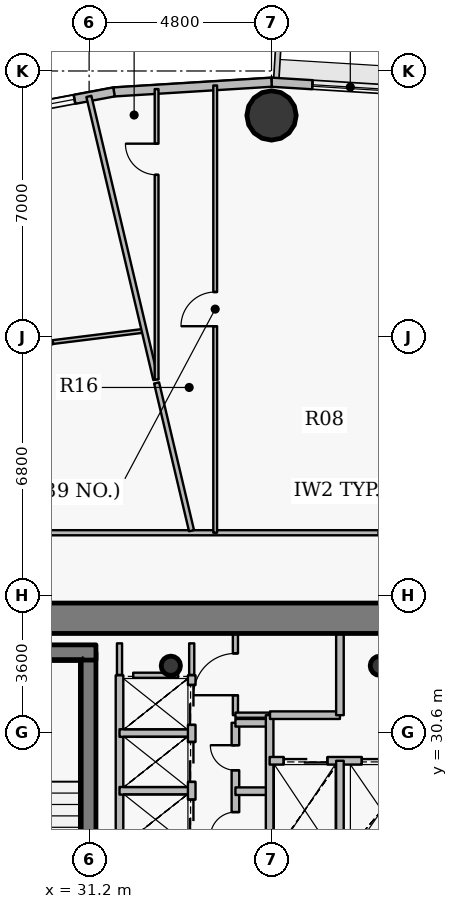
"""IFC4 building model, lengths in metres.
Left out: names, types, materials, properties, quantities, classifications, styles, units other than length and angle.
Written with IfcOpenShell. Run it as: python <this file> out.ifc"""

import sys

from ifc_helpers import new_model, si_unit, direction, frame, frame_2d, origin, origin_2d, place, context, subcontext, project, spatial, rectangle, hollow_circle, extrude, source, transform, mapped, element, fill, save


model = new_model("IFC4")
c1 = context("Model", 3, precision=1e-05, world=origin(), true_north=direction((0.0, 1.0)))
c2 = subcontext(c1, "Body", "Model", "MODEL_VIEW")
j1 = project(units=[si_unit("LENGTHUNIT", "METRE"), si_unit("PLANEANGLEUNIT", "RADIAN")], contexts=[c1])
p1 = place(None, origin())
s1 = spatial("IfcSite", under=j1, at=p1, CompositionType="ELEMENT")
p2 = place(p1, origin())
s2 = spatial("IfcBuilding", under=s1, at=p2, CompositionType="ELEMENT")
p3 = place(p2, frame((0.0, 0.0, 163.65)))
s3 = spatial("IfcBuildingStorey", under=s2, at=p3, CompositionType="ELEMENT", Elevation=163.65)
for number, where, z_axis, x_axis in (
    (1, (38.85, 32.35, 0.0), (0.0, 0.0, 1.0), (1.0, 0.0, 0.0)),
    (2, (33.35, 32.35, 0.0), (0.0, 0.0, 1.0), (1.0, 0.0, 0.0)),
):
    element("IfcColumn", number, at=place(p3, frame(where, z_axis=z_axis, x_axis=x_axis)), inside=s3, PredefinedType="COLUMN", context=c2, shape_type="SweptSolid", body=[
        extrude(hollow_circle(Radius=0.254, WallThickness=0.02, at=origin_2d()), origin(), (0.0, 0.0, 1.0), 3.75),
    ])
p4 = place(p3, frame((31.18, 27.8, 0.0), z_axis=(0.0, 0.0, 1.0), x_axis=(0.0, 1.0, 0.0)))
e3 = element("IfcWall", 3, at=p4, inside=s3, PredefinedType="SHEAR", context=c2, shape_type="SweptSolid", body=[
    extrude(rectangle(XDim=4.9, YDim=0.4, at=frame_2d((2.45, 0.0))), origin(), (0.0, 0.0, 1.0), 3.75),
])
p5 = place(p3, frame((27.28, 32.7, 0.0), z_axis=(0.0, 0.0, 1.0), x_axis=(1.0, 0.0, 0.0)))
e4 = element("IfcWall", 4, at=p5, inside=s3, PredefinedType="SHEAR", context=c2, shape_type="SweptSolid", body=[
    extrude(rectangle(XDim=4.1, YDim=0.4, at=frame_2d((2.05, 0.0))), origin(), (0.0, 0.0, 1.0), 3.75),
])
p6 = place(p3, frame((27.2, 33.6, 0.0), z_axis=(0.0, 0.0, 1.0), x_axis=(1.0, 0.0, 0.0)))
e5 = element("IfcWall", 5, at=p6, inside=s3, PredefinedType="SHEAR", context=c2, shape_type="SweptSolid", body=[
    extrude(rectangle(XDim=17.6, YDim=0.8, at=frame_2d((8.8, 0.0))), origin(), (0.0, 0.0, 1.0), 2.95),
])
p7 = place(p6, frame((13.45, 0.0, 0.0)))
e6 = element("IfcOpeningElement", 6, at=p7, cuts=e5, PredefinedType="OPENING", context=c2, shape_type="SweptSolid", body=[
    extrude(rectangle(XDim=1.15, YDim=2.15, at=origin_2d()), frame((0.575, 0.41, 1.075), z_axis=(0.0, -1.0, 0.0), x_axis=(1.0, 0.0, 0.0)), (0.0, 0.0, 1.0), 0.82),
])
p8 = place(p3, frame((36.0, 46.83, 0.0), z_axis=(0.0, 0.0, 1.0), x_axis=(1.0, 0.0, 0.0)))
e7 = element("IfcColumn", 7, at=p8, inside=s3, PredefinedType="COLUMN", context=c2, shape_type="SweptSolid", body=[
    extrude(hollow_circle(Radius=0.65, WallThickness=0.04, at=origin_2d()), origin(), (0.0, 0.0, 1.0), 3.75),
])
p9 = place(p3, frame((36.0, 47.705, 0.0), z_axis=(0.0, 0.0, 1.0), x_axis=(0.998104600619, -0.061540281305, 0.0)))
e8 = element("IfcWall", 8, at=p9, inside=s3, PredefinedType="SOLIDWALL", context=c2, shape_type="SweptSolid", body=[
    extrude(rectangle(XDim=4.154, YDim=0.24, at=frame_2d((2.077, 0.0))), origin(), (0.0, 0.0, 1.0), 3.5),
])
p10 = place(p9, frame((1.077, 0.0, 0.9)))
e9 = element("IfcOpeningElement", 9, at=p10, cuts=e8, PredefinedType="OPENING", context=c2, shape_type="SweptSolid", body=[
    extrude(rectangle(XDim=2.0, YDim=1.75, at=origin_2d()), frame((1.0, 0.13, 0.875), z_axis=(0.0, -1.0, 0.0), x_axis=(1.0, 0.0, 0.0)), (0.0, 0.0, 1.0), 0.26),
])
p11 = place(p3, frame((31.854, 47.449, 0.0), z_axis=(0.0, 0.0, 1.0), x_axis=(0.998104600619, 0.061540281305, 0.0)))
e10 = element("IfcWall", 10, at=p11, inside=s3, PredefinedType="SOLIDWALL", context=c2, shape_type="SweptSolid", body=[
    extrude(rectangle(XDim=4.154, YDim=0.24, at=frame_2d((2.077, 0.0))), origin(), (0.0, 0.0, 1.0), 3.5),
])
p12 = place(p3, frame((27.811, 46.689, 0.0), z_axis=(0.0, 0.0, 1.0), x_axis=(0.982788108205, 0.184736391573, 0.0)))
e11 = element("IfcWall", 11, at=p12, inside=s3, PredefinedType="SOLIDWALL", context=c2, shape_type="SweptSolid", body=[
    extrude(rectangle(XDim=4.114, YDim=0.24, at=frame_2d((2.057, 0.0))), origin(), (0.0, 0.0, 1.0), 3.5),
])
p13 = place(p12, frame((1.057, 0.0, 0.9)))
e12 = element("IfcOpeningElement", 12, at=p13, cuts=e11, PredefinedType="OPENING", context=c2, shape_type="SweptSolid", body=[
    extrude(rectangle(XDim=2.0, YDim=1.75, at=origin_2d()), frame((1.0, 0.13, 0.875), z_axis=(0.0, -1.0, 0.0), x_axis=(1.0, 0.0, 0.0)), (0.0, 0.0, 1.0), 0.26),
])
p14 = place(p3, frame((24.35, 35.85, 0.0), z_axis=(0.0, 0.0, 1.0), x_axis=(1.0, 0.0, 0.0)))
e13 = element("IfcWall", 13, at=p14, inside=s3, PredefinedType="PARTITIONING", context=c2, shape_type="SweptSolid", body=[
    extrude(rectangle(XDim=29.104, YDim=0.135, at=frame_2d((14.552, 0.0))), origin(), (0.0, 0.0, 1.0), 2.935),
])
p15 = place(p14, frame((15.972, 0.0, 0.0)))
e14 = element("IfcOpeningElement", 14, at=p15, cuts=e13, PredefinedType="OPENING", context=c2, shape_type="SweptSolid", body=[
    extrude(rectangle(XDim=1.0, YDim=2.15, at=origin_2d()), frame((0.5, 0.078, 1.075), z_axis=(0.0, -1.0, 0.0), x_axis=(1.0, 0.0, 0.0)), (0.0, 0.0, 1.0), 0.155),
])
p16 = place(p14, frame((4.074, 0.0, 0.0)))
e15 = element("IfcOpeningElement", 15, at=p16, cuts=e13, PredefinedType="OPENING", context=c2, shape_type="SweptSolid", body=[
    extrude(rectangle(XDim=1.0, YDim=2.15, at=origin_2d()), frame((0.5, 0.078, 1.075), z_axis=(0.0, -1.0, 0.0), x_axis=(1.0, 0.0, 0.0)), (0.0, 0.0, 1.0), 0.155),
])
p17 = place(p3, frame((26.021, 39.181, 0.0), z_axis=(0.0, 0.0, 1.0), x_axis=(0.928787254853, 0.37061332305, 0.0)))
e16 = element("IfcWall", 16, at=p17, inside=s3, PredefinedType="PARTITIONING", context=c2, shape_type="SweptSolid", body=[
    extrude(rectangle(XDim=4.549, YDim=0.1, at=frame_2d((2.275, 0.0))), origin(), (0.0, 0.0, 1.0), 2.935),
])
p18 = place(p3, frame((30.246, 40.867, 0.0), z_axis=(0.0, 0.0, 1.0), x_axis=(0.99240598239, 0.123005553192, 0.0)))
e17 = element("IfcWall", 17, at=p18, inside=s3, PredefinedType="PARTITIONING", context=c2, shape_type="SweptSolid", body=[
    extrude(rectangle(XDim=2.423, YDim=0.1, at=frame_2d((1.212, 0.0))), origin(), (0.0, 0.0, 1.0), 2.935),
])
p19 = place(p3, frame((31.194, 47.33, 0.0), z_axis=(0.0, 0.0, 1.0), x_axis=(0.230064999041, -0.973175264902, 0.0)))
e18 = element("IfcWall", 18, at=p19, inside=s3, PredefinedType="PARTITIONING", context=c2, shape_type="SweptSolid", body=[
    extrude(rectangle(XDim=7.654, YDim=0.135, at=frame_2d((3.827, 0.0))), origin(), (0.0, 0.0, 1.0), 2.935),
])
p20 = place(p3, frame((32.0, 24.1, 0.0), z_axis=(0.0, 0.0, 1.0), x_axis=(0.0, 1.0, 0.0)))
e19 = element("IfcWall", 19, at=p20, inside=s3, PredefinedType="PARTITIONING", context=c2, shape_type="SweptSolid", body=[
    extrude(rectangle(XDim=8.0, YDim=0.2, at=frame_2d((4.0, 0.0))), origin(), (0.0, 0.0, 1.0), 3.5),
])
for number, where, z_axis, x_axis in (
    (20, (32.0, 29.06, 0.0), (0.0, 0.0, 1.0), (1.0, 0.0, 0.0)),
    (21, (32.0, 30.58, 0.0), (0.0, 0.0, 1.0), (1.0, 0.0, 0.0)),
):
    element("IfcWall", number, at=place(p3, frame(where, z_axis=z_axis, x_axis=x_axis)), inside=s3, PredefinedType="PARTITIONING", context=c2, shape_type="SweptSolid", body=[
        extrude(rectangle(XDim=1.9, YDim=0.2, at=frame_2d((0.95, 0.0))), origin(), (0.0, 0.0, 1.0), 3.085),
    ])
p21 = place(p3, frame((32.976, 39.792, 0.0), z_axis=(0.0, 0.0, 1.0), x_axis=(0.230050705958, -0.973178643769, 0.0)))
e22 = element("IfcWall", 22, at=p21, inside=s3, PredefinedType="PARTITIONING", context=c2, shape_type="SweptSolid", body=[
    extrude(rectangle(XDim=3.996, YDim=0.135, at=frame_2d((1.998, 0.0))), origin(), (0.0, 0.0, 1.0), 3.5),
])
p22 = place(p3, frame((32.976, 39.884, 0.0), z_axis=(0.0, 0.0, 1.0), x_axis=(0.0, 1.0, 0.0)))
e23 = element("IfcWall", 23, at=p22, inside=s3, PredefinedType="PARTITIONING", context=c2, shape_type="SweptSolid", body=[
    extrude(rectangle(XDim=7.64, YDim=0.1, at=frame_2d((3.82, 0.0))), origin(), (0.0, 0.0, 1.0), 2.935),
])
p23 = place(p22, frame((5.384, 0.0, 0.0)))
e24 = element("IfcOpeningElement", 24, at=p23, cuts=e23, PredefinedType="OPENING", context=c2, shape_type="SweptSolid", body=[
    extrude(rectangle(XDim=0.82, YDim=2.1, at=origin_2d()), frame((0.41, 0.06, 1.05), z_axis=(0.0, -1.0, 0.0), x_axis=(1.0, 0.0, 0.0)), (0.0, 0.0, 1.0), 0.12),
])
p24 = place(p3, frame((33.9, 20.8, 0.0), z_axis=(0.0, 0.0, 1.0), x_axis=(0.0, 1.0, 0.0)))
e25 = element("IfcWall", 25, at=p24, inside=s3, PredefinedType="PARTITIONING", context=c2, shape_type="SweptSolid", body=[
    extrude(rectangle(XDim=11.3, YDim=0.2, at=frame_2d((5.65, 0.0))), origin(), (0.0, 0.0, 1.0), 3.085),
])
p25 = place(p24, frame((6.98, 0.0, 0.0)))
e26 = element("IfcOpeningElement", 26, at=p25, cuts=e25, PredefinedType="OPENING", context=c2, shape_type="SweptSolid", body=[
    extrude(rectangle(XDim=1.05, YDim=2.15, at=origin_2d()), frame((0.525, 0.11, 1.075), z_axis=(0.0, -1.0, 0.0), x_axis=(1.0, 0.0, 0.0)), (0.0, 0.0, 1.0), 0.22),
])
p26 = place(p24, frame((8.495, 0.0, 0.0)))
e27 = element("IfcOpeningElement", 27, at=p26, cuts=e25, PredefinedType="OPENING", context=c2, shape_type="SweptSolid", body=[
    extrude(rectangle(XDim=1.05, YDim=2.15, at=origin_2d()), frame((0.525, 0.11, 1.075), z_axis=(0.0, -1.0, 0.0), x_axis=(1.0, 0.0, 0.0)), (0.0, 0.0, 1.0), 0.22),
])
p27 = place(p24, frame((9.995, 0.0, 0.0)))
e28 = element("IfcOpeningElement", 28, at=p27, cuts=e25, PredefinedType="OPENING", context=c2, shape_type="SweptSolid", body=[
    extrude(rectangle(XDim=1.05, YDim=2.15, at=origin_2d()), frame((0.525, 0.11, 1.075), z_axis=(0.0, -1.0, 0.0), x_axis=(1.0, 0.0, 0.0)), (0.0, 0.0, 1.0), 0.22),
])
p28 = place(p3, frame((34.518, 35.85, 0.0), z_axis=(0.0, 0.0, 1.0), x_axis=(0.0, 1.0, 0.0)))
e29 = element("IfcWall", 29, at=p28, inside=s3, PredefinedType="PARTITIONING", context=c2, shape_type="SweptSolid", body=[
    extrude(rectangle(XDim=11.769, YDim=0.1, at=frame_2d((5.884, 0.0))), origin(), (0.0, 0.0, 1.0), 2.935),
])
p29 = place(p28, frame((5.434, 0.0, 0.0)))
e30 = element("IfcOpeningElement", 30, at=p29, cuts=e29, PredefinedType="OPENING", context=c2, shape_type="SweptSolid", body=[
    extrude(rectangle(XDim=0.9, YDim=2.1, at=origin_2d()), frame((0.45, 0.06, 1.05), z_axis=(0.0, -1.0, 0.0), x_axis=(1.0, 0.0, 0.0)), (0.0, 0.0, 1.0), 0.12),
])
p30 = place(p3, frame((35.05, 27.25, 0.0), z_axis=(0.0, 0.0, 1.0), x_axis=(0.0, 1.0, 0.0)))
e31 = element("IfcWall", 31, at=p30, inside=s3, PredefinedType="PARTITIONING", context=c2, shape_type="SweptSolid", body=[
    extrude(rectangle(XDim=3.6, YDim=0.2, at=frame_2d((1.8, 0.0))), origin(), (0.0, 0.0, 1.0), 3.5),
])
p31 = place(p30, frame((0.59, 0.0, 0.0)))
e32 = element("IfcOpeningElement", 32, at=p31, cuts=e31, PredefinedType="OPENING", context=c2, shape_type="SweptSolid", body=[
    extrude(rectangle(XDim=0.66, YDim=2.05, at=origin_2d()), frame((0.33, 0.11, 1.025), z_axis=(0.0, -1.0, 0.0), x_axis=(1.0, 0.0, 0.0)), (0.0, 0.0, 1.0), 0.22),
])
p32 = place(p30, frame((2.35, 0.0, 0.0)))
e33 = element("IfcOpeningElement", 33, at=p32, cuts=e31, PredefinedType="OPENING", context=c2, shape_type="SweptSolid", body=[
    extrude(rectangle(XDim=0.66, YDim=2.05, at=origin_2d()), frame((0.33, 0.11, 1.025), z_axis=(0.0, -1.0, 0.0), x_axis=(1.0, 0.0, 0.0)), (0.0, 0.0, 1.0), 0.22),
])
for number, where, z_axis, x_axis in (
    (34, (35.05, 29.05, 0.0), (0.0, 0.0, 1.0), (1.0, 0.0, 0.0)),
    (35, (35.05, 30.85, 0.0), (0.0, 0.0, 1.0), (1.0, 0.0, 0.0)),
):
    element("IfcWall", number, at=place(p3, frame(where, z_axis=z_axis, x_axis=x_axis)), inside=s3, PredefinedType="PARTITIONING", context=c2, shape_type="SweptSolid", body=[
        extrude(rectangle(XDim=0.9, YDim=0.2, at=frame_2d((0.45, 0.0))), origin(), (0.0, 0.0, 1.0), 3.5),
    ])
p33 = place(p3, frame((35.05, 31.05, 0.0), z_axis=(0.0, 0.0, 1.0), x_axis=(0.0, 1.0, 0.0)))
e36 = element("IfcWall", 36, at=p33, inside=s3, PredefinedType="PARTITIONING", context=c2, shape_type="SweptSolid", body=[
    extrude(rectangle(XDim=2.15, YDim=0.135, at=frame_2d((1.075, 0.0))), origin(), (0.0, 0.0, 1.0), 3.085),
])
p34 = place(p33, frame((0.525, 0.0, 0.0)))
e37 = element("IfcOpeningElement", 37, at=p34, cuts=e36, PredefinedType="OPENING", context=c2, shape_type="SweptSolid", body=[
    extrude(rectangle(XDim=1.1, YDim=2.15, at=origin_2d()), frame((0.55, 0.078, 1.075), z_axis=(0.0, -1.0, 0.0), x_axis=(1.0, 0.0, 0.0)), (0.0, 0.0, 1.0), 0.155),
])
p35 = place(p3, frame((35.05, 31.05, 0.0), z_axis=(0.0, 0.0, 1.0), x_axis=(1.0, 0.0, 0.0)))
e38 = element("IfcWall", 38, at=p35, inside=s3, PredefinedType="PARTITIONING", context=c2, shape_type="SweptSolid", body=[
    extrude(rectangle(XDim=0.9, YDim=0.135, at=frame_2d((0.45, 0.0))), origin(), (0.0, 0.0, 1.0), 3.5),
])
p36 = place(p3, frame((35.95, 27.25, 0.0), z_axis=(0.0, 0.0, 1.0), x_axis=(0.0, 1.0, 0.0)))
e39 = element("IfcWall", 39, at=p36, inside=s3, PredefinedType="PARTITIONING", context=c2, shape_type="SweptSolid", body=[
    extrude(rectangle(XDim=3.8, YDim=0.2, at=frame_2d((1.9, 0.0))), origin(), (0.0, 0.0, 1.0), 3.5),
])
p37 = place(p3, frame((35.95, 29.85, 0.0), z_axis=(0.0, 0.0, 1.0), x_axis=(1.0, 0.0, 0.0)))
e40 = element("IfcWall", 40, at=p37, inside=s3, PredefinedType="PARTITIONING", context=c2, shape_type="SweptSolid", body=[
    extrude(rectangle(XDim=8.49, YDim=0.2, at=frame_2d((4.245, 0.0))), origin(), (0.0, 0.0, 1.0), 3.085),
])
p38 = place(p37, frame((6.1, 0.0, 0.0)))
e41 = element("IfcOpeningElement", 41, at=p38, cuts=e40, PredefinedType="OPENING", context=c2, shape_type="SweptSolid", body=[
    extrude(rectangle(XDim=1.2, YDim=2.15, at=origin_2d()), frame((0.6, 0.11, 1.075), z_axis=(0.0, -1.0, 0.0), x_axis=(1.0, 0.0, 0.0)), (0.0, 0.0, 1.0), 0.22),
])
p39 = place(p37, frame((0.37, 0.0, 0.0)))
e42 = element("IfcOpeningElement", 42, at=p39, cuts=e40, PredefinedType="OPENING", context=c2, shape_type="SweptSolid", body=[
    extrude(rectangle(XDim=1.15, YDim=2.15, at=origin_2d()), frame((0.575, 0.11, 1.075), z_axis=(0.0, -1.0, 0.0), x_axis=(1.0, 0.0, 0.0)), (0.0, 0.0, 1.0), 0.22),
])
p40 = place(p37, frame((2.425, 0.0, 0.0)))
e43 = element("IfcOpeningElement", 43, at=p40, cuts=e40, PredefinedType="OPENING", context=c2, shape_type="SweptSolid", body=[
    extrude(rectangle(XDim=1.05, YDim=2.15, at=origin_2d()), frame((0.525, 0.11, 1.075), z_axis=(0.0, -1.0, 0.0), x_axis=(1.0, 0.0, 0.0)), (0.0, 0.0, 1.0), 0.22),
])
p41 = place(p3, frame((35.96, 31.05, 0.0), z_axis=(0.0, 0.0, 1.0), x_axis=(1.0, 0.0, 0.0)))
e44 = element("IfcWall", 44, at=p41, inside=s3, PredefinedType="PARTITIONING", context=c2, shape_type="SweptSolid", body=[
    extrude(rectangle(XDim=1.84, YDim=0.2, at=frame_2d((0.92, 0.0))), origin(), (0.0, 0.0, 1.0), 3.5),
])
p42 = place(p3, frame((37.8, 27.25, 0.0), z_axis=(0.0, 0.0, 1.0), x_axis=(0.0, 1.0, 0.0)))
e45 = element("IfcWall", 45, at=p42, inside=s3, PredefinedType="PARTITIONING", context=c2, shape_type="SweptSolid", body=[
    extrude(rectangle(XDim=2.6, YDim=0.2, at=frame_2d((1.3, 0.0))), origin(), (0.0, 0.0, 1.0), 3.5),
])
p43 = place(p3, frame((37.8, 31.05, 0.0), z_axis=(0.0, 0.0, 1.0), x_axis=(0.0, 1.0, 0.0)))
e46 = element("IfcWall", 46, at=p43, inside=s3, PredefinedType="PARTITIONING", context=c2, shape_type="SweptSolid", body=[
    extrude(rectangle(XDim=2.15, YDim=0.2, at=frame_2d((1.075, 0.0))), origin(), (0.0, 0.0, 1.0), 3.085),
])
p44 = place(p3, frame((32.36, 32.1, 0.0), z_axis=(0.0, 0.0, 1.0), x_axis=(1.0, 0.0, 0.0)))
e47 = element("IfcWall", 47, at=p44, inside=s3, PredefinedType="PARTITIONING", context=c2, shape_type="SweptSolid", body=[
    extrude(rectangle(XDim=1.18, YDim=0.135, at=frame_2d((0.59, 0.0))), origin(), (0.0, 0.0, 1.0), 3.085),
])
p45 = place(p3, frame((32.0, 32.94, 0.0), z_axis=(0.0, 0.0, 1.0), x_axis=(0.0, -1.0, 0.0)))
e48 = element("IfcWall", 48, at=p45, inside=s3, PredefinedType="PARTITIONING", context=c2, shape_type="SweptSolid", body=[
    extrude(rectangle(XDim=0.83, YDim=0.135, at=frame_2d((0.415, 0.0))), origin(), (0.0, 0.0, 1.0), 3.035),
])
p46 = place(p3, frame((33.9, 32.11, 0.0), z_axis=(0.0, 0.0, 1.0), x_axis=(0.0, 1.0, 0.0)))
e49 = element("IfcWall", 49, at=p46, inside=s3, PredefinedType="PARTITIONING", context=c2, shape_type="SweptSolid", body=[
    extrude(rectangle(XDim=0.83, YDim=0.135, at=frame_2d((0.415, 0.0))), origin(), (0.0, 0.0, 1.0), 3.085),
])
m1 = source(origin(), c2, "Body", "SweptSolid", [
    extrude(rectangle(XDim=2.0, YDim=1.75, at=origin_2d()), frame((1.0, 0.03, 0.875), z_axis=(0.0, -1.0, 0.0), x_axis=(1.0, 0.0, 0.0)), (0.0, 0.0, 1.0), 0.06),
])
p47 = place(p10, origin())
e50 = element("IfcWindow", 50, at=p47, inside=s3, PartitioningType="DOUBLE_PANEL_VERTICAL", PredefinedType="WINDOW", context=c2, shape_type="MappedRepresentation", body=[
    mapped(m1, transform((0.0, 0.0, 0.0), x_axis=(1.0, 0.0, 0.0), y_axis=(0.0, 1.0, 0.0), z_axis=(0.0, 0.0, 1.0), scale=1.0)),
])
fill(e9, e50)
p48 = place(p13, origin())
e51 = element("IfcWindow", 51, at=p48, inside=s3, PartitioningType="DOUBLE_PANEL_VERTICAL", PredefinedType="WINDOW", context=c2, shape_type="MappedRepresentation", body=[
    mapped(m1, transform((0.0, 0.0, 0.0), x_axis=(1.0, 0.0, 0.0), y_axis=(0.0, 1.0, 0.0), z_axis=(0.0, 0.0, 1.0), scale=1.0)),
])
fill(e12, e51)
m2 = source(origin(), c2, "Body", "SweptSolid", [
    extrude(rectangle(XDim=1.15, YDim=2.15, at=origin_2d()), frame((0.575, 0.025, 1.075), z_axis=(0.0, -1.0, 0.0), x_axis=(1.0, 0.0, 0.0)), (0.0, 0.0, 1.0), 0.05),
])
p49 = place(p39, origin())
e52 = element("IfcDoor", 52, at=p49, inside=s3, OperationType="DOUBLE_DOOR_SLIDING", PredefinedType="USERDEFINED", context=c2, shape_type="MappedRepresentation", body=[
    mapped(m2, transform((0.0, 0.0, 0.0), x_axis=(1.0, 0.0, 0.0), y_axis=(0.0, 1.0, 0.0), z_axis=(0.0, 0.0, 1.0), scale=1.0)),
])
fill(e42, e52)
m3 = source(origin(), c2, "Body", "SweptSolid", [
    extrude(rectangle(XDim=1.05, YDim=2.15, at=origin_2d()), frame((0.525, 0.025, 1.075), z_axis=(0.0, -1.0, 0.0), x_axis=(1.0, 0.0, 0.0)), (0.0, 0.0, 1.0), 0.05),
])
p50 = place(p40, origin())
e53 = element("IfcDoor", 53, at=p50, inside=s3, OperationType="DOUBLE_DOOR_SLIDING", PredefinedType="USERDEFINED", context=c2, shape_type="MappedRepresentation", body=[
    mapped(m3, transform((0.0, 0.0, 0.0), x_axis=(1.0, 0.0, 0.0), y_axis=(0.0, 1.0, 0.0), z_axis=(0.0, 0.0, 1.0), scale=1.0)),
])
fill(e43, e53)
p51 = place(p25, origin())
e54 = element("IfcDoor", 54, at=p51, inside=s3, OperationType="DOUBLE_DOOR_SLIDING", PredefinedType="USERDEFINED", context=c2, shape_type="MappedRepresentation", body=[
    mapped(m3, transform((0.0, 0.0, 0.0), x_axis=(1.0, 0.0, 0.0), y_axis=(0.0, 1.0, 0.0), z_axis=(0.0, 0.0, 1.0), scale=1.0)),
])
fill(e26, e54)
p52 = place(p26, origin())
e55 = element("IfcDoor", 55, at=p52, inside=s3, OperationType="DOUBLE_DOOR_SLIDING", PredefinedType="USERDEFINED", context=c2, shape_type="MappedRepresentation", body=[
    mapped(m3, transform((0.0, 0.0, 0.0), x_axis=(1.0, 0.0, 0.0), y_axis=(0.0, 1.0, 0.0), z_axis=(0.0, 0.0, 1.0), scale=1.0)),
])
fill(e27, e55)
p53 = place(p27, origin())
e56 = element("IfcDoor", 56, at=p53, inside=s3, OperationType="DOUBLE_DOOR_SLIDING", PredefinedType="USERDEFINED", context=c2, shape_type="MappedRepresentation", body=[
    mapped(m3, transform((0.0, 0.0, 0.0), x_axis=(1.0, 0.0, 0.0), y_axis=(0.0, 1.0, 0.0), z_axis=(0.0, 0.0, 1.0), scale=1.0)),
])
fill(e28, e56)
m4 = source(origin(), c2, "Body", "SweptSolid", [
    extrude(rectangle(XDim=0.9, YDim=2.1, at=origin_2d()), frame((0.45, 0.025, 1.05), z_axis=(0.0, -1.0, 0.0), x_axis=(1.0, 0.0, 0.0)), (0.0, 0.0, 1.0), 0.05),
])
p54 = place(p29, origin())
e57 = element("IfcDoor", 57, at=p54, inside=s3, OperationType="SINGLE_SWING_LEFT", PredefinedType="DOOR", context=c2, shape_type="MappedRepresentation", body=[
    mapped(m4, transform((0.0, 0.0, 0.0), x_axis=(1.0, 0.0, 0.0), y_axis=(0.0, 1.0, 0.0), z_axis=(0.0, 0.0, 1.0), scale=1.0)),
])
fill(e30, e57)
m5 = source(origin(), c2, "Body", "SweptSolid", [
    extrude(rectangle(XDim=0.82, YDim=2.1, at=origin_2d()), frame((0.41, 0.025, 1.05), z_axis=(0.0, -1.0, 0.0), x_axis=(1.0, 0.0, 0.0)), (0.0, 0.0, 1.0), 0.05),
])
p55 = place(p23, origin())
e58 = element("IfcDoor", 58, at=p55, inside=s3, OperationType="SINGLE_SWING_RIGHT", PredefinedType="DOOR", context=c2, shape_type="MappedRepresentation", body=[
    mapped(m5, transform((0.0, 0.0, 0.0), x_axis=(1.0, 0.0, 0.0), y_axis=(0.0, 1.0, 0.0), z_axis=(0.0, 0.0, 1.0), scale=1.0)),
])
fill(e24, e58)
m6 = source(origin(), c2, "Body", "SweptSolid", [
    extrude(rectangle(XDim=0.66, YDim=2.05, at=origin_2d()), frame((0.33, 0.025, 1.025), z_axis=(0.0, -1.0, 0.0), x_axis=(1.0, 0.0, 0.0)), (0.0, 0.0, 1.0), 0.05),
])
p56 = place(p31, origin())
e59 = element("IfcDoor", 59, at=p56, inside=s3, OperationType="SINGLE_SWING_LEFT", PredefinedType="USERDEFINED", context=c2, shape_type="MappedRepresentation", body=[
    mapped(m6, transform((0.0, 0.0, 0.0), x_axis=(1.0, 0.0, 0.0), y_axis=(0.0, 1.0, 0.0), z_axis=(0.0, 0.0, 1.0), scale=1.0)),
])
fill(e32, e59)
p57 = place(p32, origin())
e60 = element("IfcDoor", 60, at=p57, inside=s3, OperationType="SINGLE_SWING_RIGHT", PredefinedType="USERDEFINED", context=c2, shape_type="MappedRepresentation", body=[
    mapped(m6, transform((0.0, 0.0, 0.0), x_axis=(1.0, 0.0, 0.0), y_axis=(0.0, 1.0, 0.0), z_axis=(0.0, 0.0, 1.0), scale=1.0)),
])
fill(e33, e60)
m7 = source(origin(), c2, "Body", "SweptSolid", [
    extrude(rectangle(XDim=1.1, YDim=2.15, at=origin_2d()), frame((0.55, 0.025, 1.075), z_axis=(0.0, -1.0, 0.0), x_axis=(1.0, 0.0, 0.0)), (0.0, 0.0, 1.0), 0.05),
])
p58 = place(p34, origin())
e61 = element("IfcDoor", 61, at=p58, inside=s3, OperationType="SINGLE_SWING_LEFT", PredefinedType="DOOR", context=c2, shape_type="MappedRepresentation", body=[
    mapped(m7, transform((0.0, 0.0, 0.0), x_axis=(1.0, 0.0, 0.0), y_axis=(0.0, 1.0, 0.0), z_axis=(0.0, 0.0, 1.0), scale=1.0)),
])
fill(e37, e61)
save(model, sys.argv[1])
